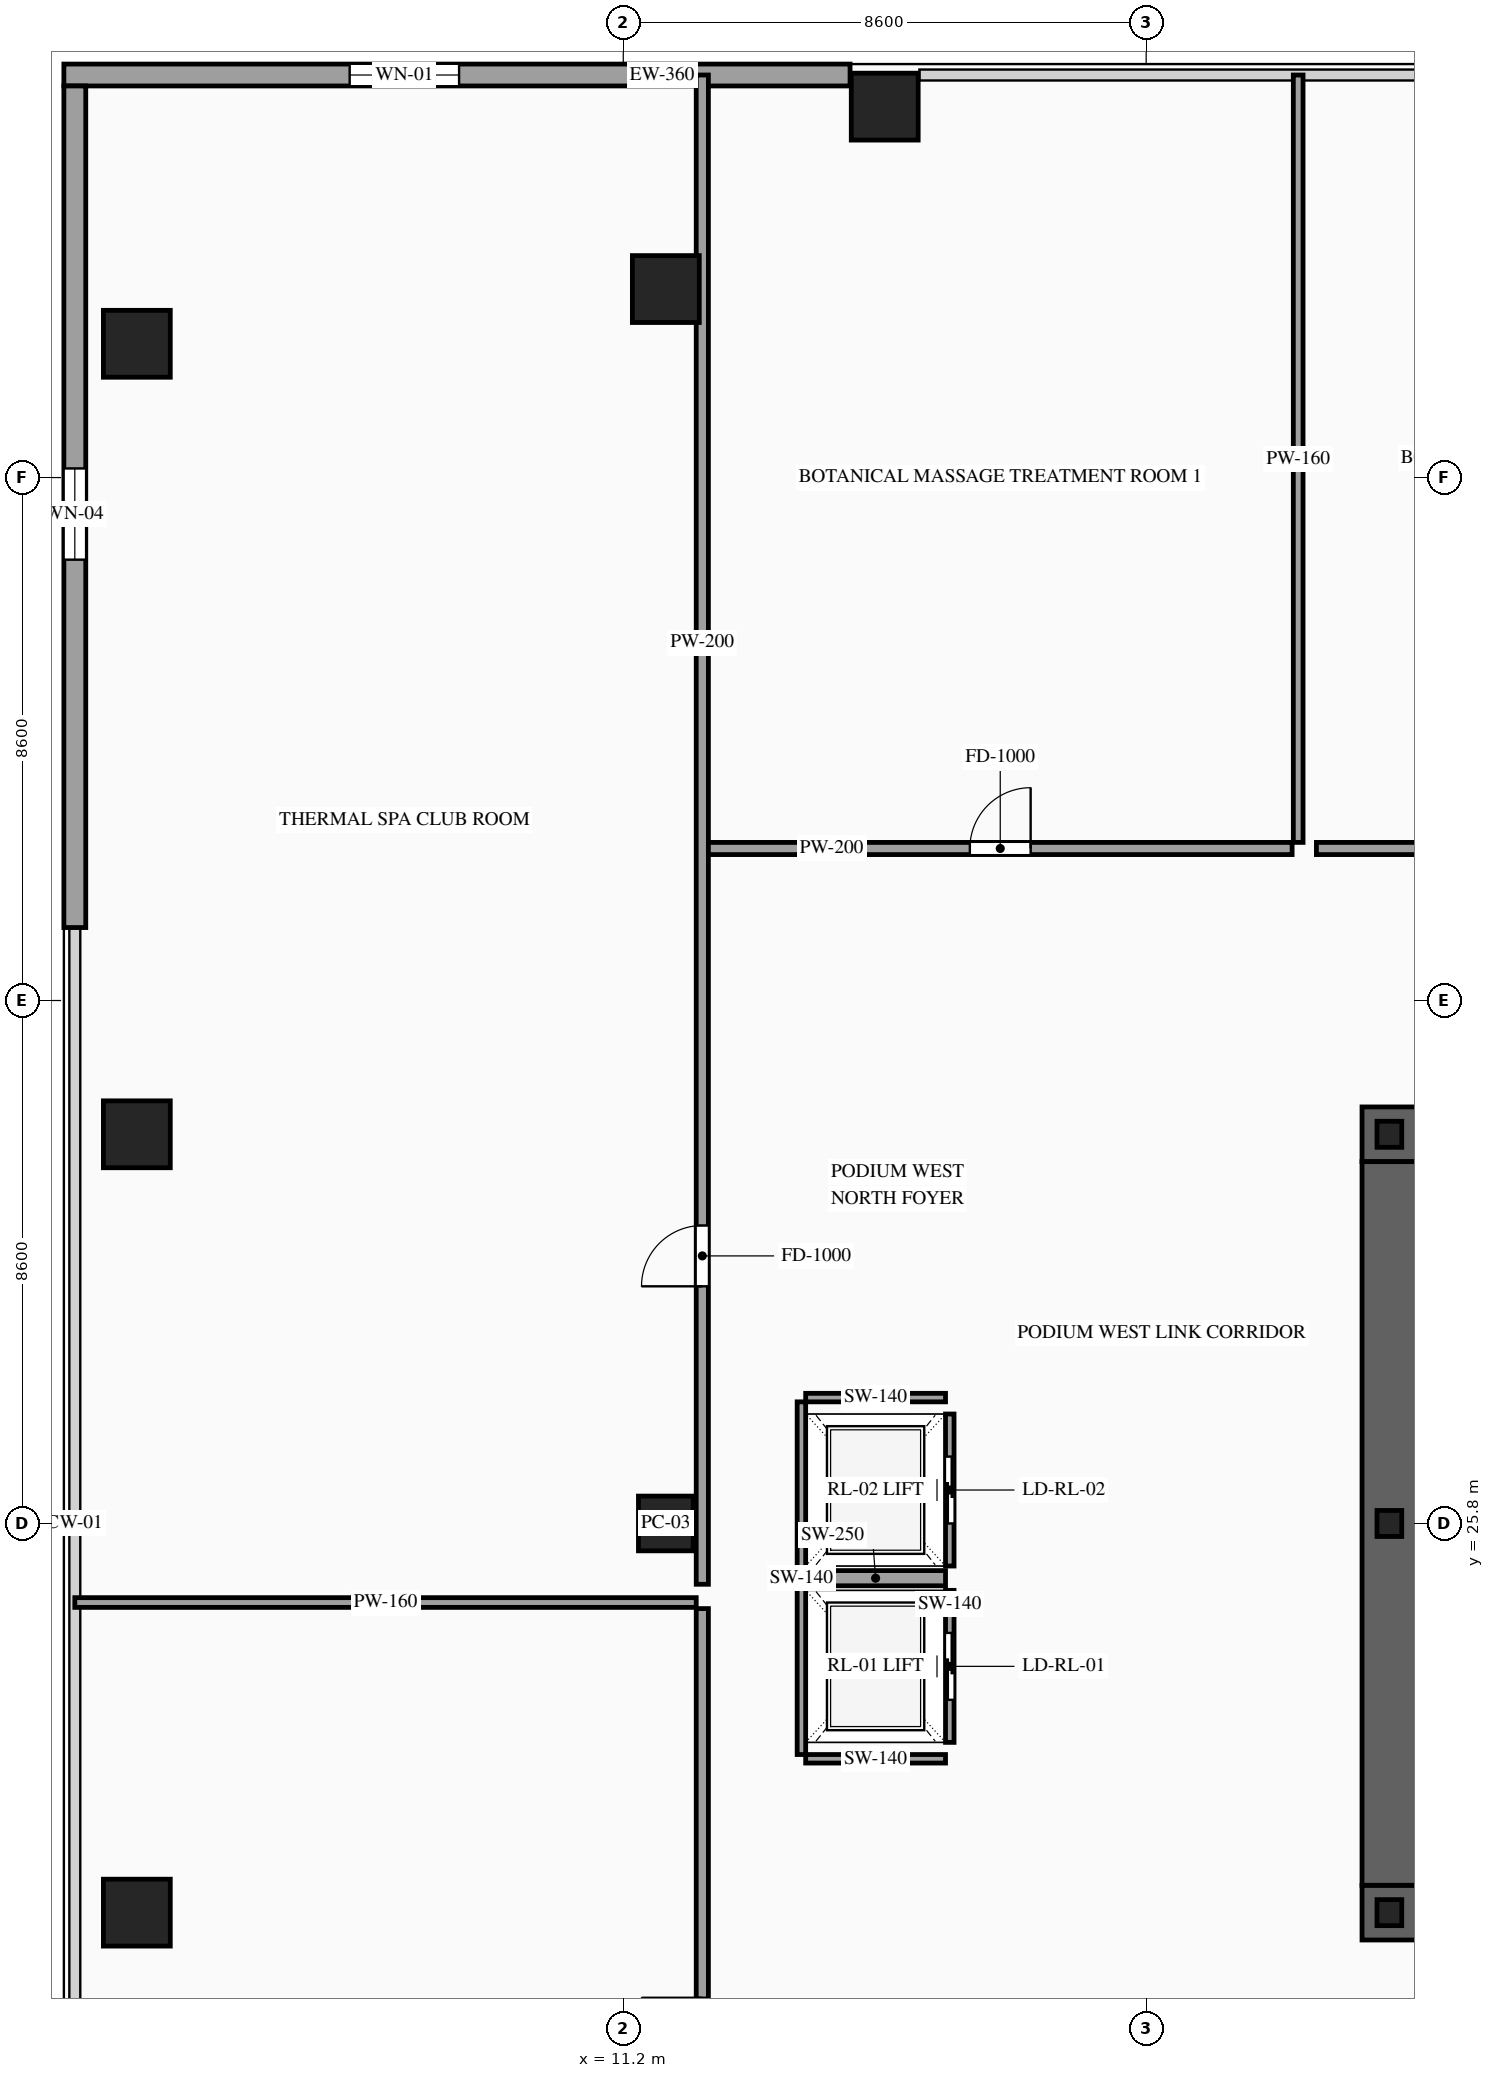
"""IFC4 building model, lengths in metres.
Left out: names, types, materials, properties, quantities, classifications, styles, units other than length and angle.
Written with IfcOpenShell. Run it as: python <this file> out.ifc"""

import sys

from ifc_helpers import new_model, si_unit, direction, frame, frame_2d, origin, origin_2d, place, context, subcontext, project, spatial, rectangle, i_section, extrude, source, transform, mapped, element, fill, save


model = new_model("IFC4")
c1 = context("Model", 3, precision=1e-05, world=origin(), true_north=direction((0.0, 1.0)))
c2 = subcontext(c1, "Body", "Model", "MODEL_VIEW")
j1 = project(units=[si_unit("LENGTHUNIT", "METRE"), si_unit("PLANEANGLEUNIT", "RADIAN")], contexts=[c1])
p1 = place(None, origin())
s1 = spatial("IfcSite", under=j1, at=p1, CompositionType="ELEMENT")
p2 = place(p1, origin())
s2 = spatial("IfcBuilding", under=s1, at=p2, CompositionType="ELEMENT")
p3 = place(p2, frame((0.0, 0.0, 15.0)))
s3 = spatial("IfcBuildingStorey", under=s2, at=p3, CompositionType="ELEMENT", Elevation=15.0)
p4 = place(p3, frame((23.35, 19.4, 0.0), z_axis=(0.0, 0.0, 1.0), x_axis=(1.0, 0.0, 0.0)))
e1 = element("IfcWall", 1, at=p4, inside=s3, PredefinedType="SHEAR", context=c2, shape_type="SweptSolid", body=[
    extrude(rectangle(XDim=27.3, YDim=0.9, at=frame_2d((13.65, 0.0))), origin(), (0.0, 0.0, 1.0), 4.8),
])
p5 = place(p4, frame((2.1, 0.0, 0.0)))
e2 = element("IfcOpeningElement", 2, at=p5, cuts=e1, PredefinedType="OPENING", context=c2, shape_type="SweptSolid", body=[
    extrude(rectangle(XDim=1.1, YDim=2.2, at=frame_2d((0.55, 1.1))), frame((0.0, 0.465, 0.0), z_axis=(0.0, -1.0, 0.0), x_axis=(1.0, 0.0, 0.0)), (0.0, 0.0, 1.0), 0.93),
])
p6 = place(p4, frame((10.0, 0.0, 0.0)))
e3 = element("IfcOpeningElement", 3, at=p6, cuts=e1, PredefinedType="OPENING", context=c2, shape_type="SweptSolid", body=[
    extrude(rectangle(XDim=1.1, YDim=2.2, at=frame_2d((0.55, 1.1))), frame((0.0, 0.465, 0.0), z_axis=(0.0, -1.0, 0.0), x_axis=(1.0, 0.0, 0.0)), (0.0, 0.0, 1.0), 0.93),
])
p7 = place(p4, frame((23.2, 0.0, 0.0)))
e4 = element("IfcOpeningElement", 4, at=p7, cuts=e1, PredefinedType="OPENING", context=c2, shape_type="SweptSolid", body=[
    extrude(rectangle(XDim=1.1, YDim=2.2, at=frame_2d((0.55, 1.1))), frame((0.0, 0.465, 0.0), z_axis=(0.0, -1.0, 0.0), x_axis=(1.0, 0.0, 0.0)), (0.0, 0.0, 1.0), 0.93),
])
p8 = place(p4, frame((19.82, 0.0, 0.0)))
e5 = element("IfcOpeningElement", 5, at=p8, cuts=e1, PredefinedType="OPENING", context=c2, shape_type="SweptSolid", body=[
    extrude(rectangle(XDim=0.9, YDim=2.15, at=frame_2d((0.45, 1.075))), frame((0.0, 0.465, 0.0), z_axis=(0.0, -1.0, 0.0), x_axis=(1.0, 0.0, 0.0)), (0.0, 0.0, 1.0), 0.93),
])
p9 = place(p4, frame((18.38, 0.0, 0.0)))
e6 = element("IfcOpeningElement", 6, at=p9, cuts=e1, PredefinedType="OPENING", context=c2, shape_type="SweptSolid", body=[
    extrude(rectangle(XDim=0.9, YDim=2.15, at=frame_2d((0.45, 1.075))), frame((0.0, 0.465, 0.0), z_axis=(0.0, -1.0, 0.0), x_axis=(1.0, 0.0, 0.0)), (0.0, 0.0, 1.0), 0.93),
])
p10 = place(p3, frame((23.35, 32.2, 0.0), z_axis=(0.0, 0.0, 1.0), x_axis=(1.0, 0.0, 0.0)))
e7 = element("IfcWall", 7, at=p10, inside=s3, PredefinedType="SHEAR", context=c2, shape_type="SweptSolid", body=[
    extrude(rectangle(XDim=27.3, YDim=0.9, at=frame_2d((13.65, 0.0))), origin(), (0.0, 0.0, 1.0), 4.8),
])
p11 = place(p10, frame((4.72, 0.0, 0.0)))
e8 = element("IfcOpeningElement", 8, at=p11, cuts=e7, PredefinedType="OPENING", context=c2, shape_type="SweptSolid", body=[
    extrude(rectangle(XDim=0.9, YDim=2.15, at=frame_2d((0.45, 1.075))), frame((0.0, 0.465, 0.0), z_axis=(0.0, -1.0, 0.0), x_axis=(1.0, 0.0, 0.0)), (0.0, 0.0, 1.0), 0.93),
])
p12 = place(p10, frame((10.0, 0.0, 0.0)))
e9 = element("IfcOpeningElement", 9, at=p12, cuts=e7, PredefinedType="OPENING", context=c2, shape_type="SweptSolid", body=[
    extrude(rectangle(XDim=1.1, YDim=2.2, at=frame_2d((0.55, 1.1))), frame((0.0, 0.465, 0.0), z_axis=(0.0, -1.0, 0.0), x_axis=(1.0, 0.0, 0.0)), (0.0, 0.0, 1.0), 0.93),
])
p13 = place(p10, frame((15.85, 0.0, 0.0)))
e10 = element("IfcOpeningElement", 10, at=p13, cuts=e7, PredefinedType="OPENING", context=c2, shape_type="SweptSolid", body=[
    extrude(rectangle(XDim=1.1, YDim=2.2, at=frame_2d((0.55, 1.1))), frame((0.0, 0.465, 0.0), z_axis=(0.0, -1.0, 0.0), x_axis=(1.0, 0.0, 0.0)), (0.0, 0.0, 1.0), 0.93),
])
p14 = place(p10, frame((19.05, 0.0, 0.0)))
e11 = element("IfcOpeningElement", 11, at=p14, cuts=e7, PredefinedType="OPENING", context=c2, shape_type="SweptSolid", body=[
    extrude(rectangle(XDim=0.9, YDim=2.15, at=frame_2d((0.45, 1.075))), frame((0.0, 0.465, 0.0), z_axis=(0.0, -1.0, 0.0), x_axis=(1.0, 0.0, 0.0)), (0.0, 0.0, 1.0), 0.93),
])
m1 = source(origin(), c2, "Body", "SweptSolid", [
    extrude(rectangle(XDim=11.9, YDim=0.9, at=frame_2d((5.95, 0.0))), origin(), (0.0, 0.0, 1.0), 4.8),
])
p15 = place(p3, frame((23.8, 19.85, 0.0), z_axis=(0.0, 0.0, 1.0), x_axis=(0.0, 1.0, 0.0)))
e12 = element("IfcWall", 12, at=p15, inside=s3, PredefinedType="SHEAR", context=c2, shape_type="MappedRepresentation", body=[
    mapped(m1, transform((0.0, 0.0, 0.0), scale=1.0)),
])
m2 = source(origin(), c2, "Body", "SweptSolid", [
    extrude(i_section(OverallWidth=0.407, OverallDepth=0.428, WebThickness=0.02, FlangeThickness=0.035, at=origin_2d()), origin(), (0.0, 0.0, 1.0), 4.8),
])
for number, where, z_axis, x_axis in (
    (13, (23.8, 19.4, 0.0), (0.0, 0.0, 1.0), (1.0, 0.0, 0.0)),
    (14, (23.8, 25.8, 0.0), (0.0, 0.0, 1.0), (1.0, 0.0, 0.0)),
    (15, (23.8, 32.2, 0.0), (0.0, 0.0, 1.0), (1.0, 0.0, 0.0)),
):
    element("IfcColumn", number, at=place(p3, frame(where, z_axis=z_axis, x_axis=x_axis)), inside=s3, PredefinedType="COLUMN", context=c2, shape_type="MappedRepresentation", body=[
        mapped(m2, transform((0.0, 0.0, 0.0), scale=1.0)),
    ])
m3 = source(origin(), c2, "Body", "SweptSolid", [
    extrude(rectangle(XDim=1.1, YDim=1.1, at=origin_2d()), origin(), (0.0, 0.0, 1.0), 4.8),
])
for number, where, z_axis, x_axis in (
    (16, (3.2, 19.4, 0.0), (0.0, 0.0, 1.0), (1.0, 0.0, 0.0)),
    (17, (3.2, 32.2, 0.0), (0.0, 0.0, 1.0), (1.0, 0.0, 0.0)),
    (18, (3.2, 45.2, 0.0), (0.0, 0.0, 1.0), (1.0, 0.0, 0.0)),
    (19, (11.9, 46.1, 0.0), (0.0, 0.0, 1.0), (1.0, 0.0, 0.0)),
    (20, (15.5, 49.1, 0.0), (0.0, 0.0, 1.0), (1.0, 0.0, 0.0)),
):
    element("IfcColumn", number, at=place(p3, frame(where, z_axis=z_axis, x_axis=x_axis)), inside=s3, PredefinedType="COLUMN", context=c2, shape_type="MappedRepresentation", body=[
        mapped(m3, transform((0.0, 0.0, 0.0), scale=1.0)),
    ])
m4 = source(origin(), c2, "Body", "SweptSolid", [
    extrude(rectangle(XDim=0.9, YDim=0.9, at=origin_2d()), origin(), (0.0, 0.0, 1.0), 4.8),
])
p16 = place(p3, frame((11.9, 25.8, 0.0), z_axis=(0.0, 0.0, 1.0), x_axis=(1.0, 0.0, 0.0)))
e21 = element("IfcColumn", 21, at=p16, inside=s3, PredefinedType="COLUMN", context=c2, shape_type="MappedRepresentation", body=[
    mapped(m4, transform((0.0, 0.0, 0.0), scale=1.0)),
])
p17 = place(p3, frame((2.0, 49.62, 0.0), z_axis=(0.0, 0.0, 1.0), x_axis=(1.0, 0.0, 0.0)))
e22 = element("IfcWall", 22, at=p17, inside=s3, PredefinedType="SOLIDWALL", context=c2, shape_type="SweptSolid", body=[
    extrude(rectangle(XDim=12.93, YDim=0.36, at=frame_2d((6.465, 0.0))), origin(), (0.0, 0.0, 1.0), 4.52),
])
p18 = place(p17, frame((4.7, 0.0, 0.9)))
e23 = element("IfcOpeningElement", 23, at=p18, cuts=e22, PredefinedType="OPENING", context=c2, shape_type="SweptSolid", body=[
    extrude(rectangle(XDim=1.8, YDim=2.2, at=frame_2d((0.9, 1.1))), frame((0.0, 0.195, 0.0), z_axis=(0.0, -1.0, 0.0), x_axis=(1.0, 0.0, 0.0)), (0.0, 0.0, 1.0), 0.39),
])
p19 = place(p3, frame((2.18, 35.6, 0.0), z_axis=(0.0, 0.0, 1.0), x_axis=(0.0, 1.0, 0.0)))
e24 = element("IfcWall", 24, at=p19, inside=s3, PredefinedType="SOLIDWALL", context=c2, shape_type="SweptSolid", body=[
    extrude(rectangle(XDim=13.84, YDim=0.36, at=frame_2d((6.92, 0.0))), origin(), (0.0, 0.0, 1.0), 4.52),
])
p20 = place(p19, frame((6.05, 0.0, 0.9)))
e25 = element("IfcOpeningElement", 25, at=p20, cuts=e24, PredefinedType="OPENING", context=c2, shape_type="SweptSolid", body=[
    extrude(rectangle(XDim=1.5, YDim=1.8, at=frame_2d((0.75, 0.9))), frame((0.0, 0.195, 0.0), z_axis=(0.0, -1.0, 0.0), x_axis=(1.0, 0.0, 0.0)), (0.0, 0.0, 1.0), 0.39),
])
p21 = place(p3, frame((16.57, 22.2, 0.0), z_axis=(0.0, 0.0, 1.0), x_axis=(0.0, 1.0, 0.0)))
e26 = element("IfcWall", 26, at=p21, inside=s3, PredefinedType="SOLIDWALL", context=c2, shape_type="SweptSolid", body=[
    extrude(rectangle(XDim=2.5, YDim=0.14, at=frame_2d((1.25, 0.0))), origin(), (0.0, 0.0, 1.0), 4.52),
])
p22 = place(p21, frame((0.7, 0.0, 0.0)))
e27 = element("IfcOpeningElement", 27, at=p22, cuts=e26, PredefinedType="OPENING", context=c2, shape_type="SweptSolid", body=[
    extrude(rectangle(XDim=1.1, YDim=2.2, at=frame_2d((0.55, 1.1))), frame((0.0, 0.085, 0.0), z_axis=(0.0, -1.0, 0.0), x_axis=(1.0, 0.0, 0.0)), (0.0, 0.0, 1.0), 0.17),
])
m5 = source(origin(), c2, "Body", "SweptSolid", [
    extrude(rectangle(XDim=2.3, YDim=0.25, at=frame_2d((1.15, 0.0))), origin(), (0.0, 0.0, 1.0), 4.52),
])
p23 = place(p3, frame((14.2, 24.9, 0.0), z_axis=(0.0, 0.0, 1.0), x_axis=(1.0, 0.0, 0.0)))
e28 = element("IfcWall", 28, at=p23, inside=s3, PredefinedType="SOLIDWALL", context=c2, shape_type="MappedRepresentation", body=[
    mapped(m5, transform((0.0, 0.0, 0.0), scale=1.0)),
])
m6 = source(origin(), c2, "Body", "SweptSolid", [
    extrude(rectangle(XDim=5.8, YDim=0.14, at=frame_2d((2.9, 0.0))), origin(), (0.0, 0.0, 1.0), 4.52),
])
p24 = place(p3, frame((14.13, 22.0, 0.0), z_axis=(0.0, 0.0, 1.0), x_axis=(0.0, 1.0, 0.0)))
e29 = element("IfcWall", 29, at=p24, inside=s3, PredefinedType="SOLIDWALL", context=c2, shape_type="MappedRepresentation", body=[
    mapped(m6, transform((0.0, 0.0, 0.0), scale=1.0)),
])
m7 = source(origin(), c2, "Body", "SweptSolid", [
    extrude(rectangle(XDim=2.3, YDim=0.14, at=frame_2d((1.15, 0.0))), origin(), (0.0, 0.0, 1.0), 4.52),
])
p25 = place(p3, frame((14.2, 21.93, 0.0), z_axis=(0.0, 0.0, 1.0), x_axis=(1.0, 0.0, 0.0)))
e30 = element("IfcWall", 30, at=p25, inside=s3, PredefinedType="SOLIDWALL", context=c2, shape_type="MappedRepresentation", body=[
    mapped(m7, transform((0.0, 0.0, 0.0), scale=1.0)),
])
p26 = place(p3, frame((16.57, 25.1, 0.0), z_axis=(0.0, 0.0, 1.0), x_axis=(0.0, 1.0, 0.0)))
e31 = element("IfcWall", 31, at=p26, inside=s3, PredefinedType="SOLIDWALL", context=c2, shape_type="SweptSolid", body=[
    extrude(rectangle(XDim=2.5, YDim=0.14, at=frame_2d((1.25, 0.0))), origin(), (0.0, 0.0, 1.0), 4.52),
])
p27 = place(p26, frame((0.7, 0.0, 0.0)))
e32 = element("IfcOpeningElement", 32, at=p27, cuts=e31, PredefinedType="OPENING", context=c2, shape_type="SweptSolid", body=[
    extrude(rectangle(XDim=1.1, YDim=2.2, at=frame_2d((0.55, 1.1))), frame((0.0, 0.085, 0.0), z_axis=(0.0, -1.0, 0.0), x_axis=(1.0, 0.0, 0.0)), (0.0, 0.0, 1.0), 0.17),
])
p28 = place(p3, frame((14.2, 27.87, 0.0), z_axis=(0.0, 0.0, 1.0), x_axis=(1.0, 0.0, 0.0)))
e33 = element("IfcWall", 33, at=p28, inside=s3, PredefinedType="SOLIDWALL", context=c2, shape_type="MappedRepresentation", body=[
    mapped(m7, transform((0.0, 0.0, 0.0), scale=1.0)),
])
p29 = place(p3, frame((12.5, 12.0, 0.0), z_axis=(0.0, 0.0, 1.0), x_axis=(0.0, 1.0, 0.0)))
e34 = element("IfcWall", 34, at=p29, inside=s3, PredefinedType="PARTITIONING", context=c2, shape_type="SweptSolid", body=[
    extrude(rectangle(XDim=12.4, YDim=0.2, at=frame_2d((6.2, 0.0))), origin(), (0.0, 0.0, 1.0), 4.52),
])
p30 = place(p29, frame((5.0, 0.0, 0.0)))
e35 = element("IfcOpeningElement", 35, at=p30, cuts=e34, PredefinedType="OPENING", context=c2, shape_type="SweptSolid", body=[
    extrude(rectangle(XDim=1.0, YDim=2.2, at=frame_2d((0.5, 1.1))), frame((0.0, 0.115, 0.0), z_axis=(0.0, -1.0, 0.0), x_axis=(1.0, 0.0, 0.0)), (0.0, 0.0, 1.0), 0.23),
])
m8 = source(origin(), c2, "Body", "SweptSolid", [
    extrude(rectangle(XDim=10.22, YDim=0.16, at=frame_2d((5.11, 0.0))), origin(), (0.0, 0.0, 1.0), 4.52),
])
p31 = place(p3, frame((2.18, 24.5, 0.0), z_axis=(0.0, 0.0, 1.0), x_axis=(1.0, 0.0, 0.0)))
e36 = element("IfcWall", 36, at=p31, inside=s3, PredefinedType="PARTITIONING", context=c2, shape_type="MappedRepresentation", body=[
    mapped(m8, transform((0.0, 0.0, 0.0), scale=1.0)),
])
p32 = place(p3, frame((12.5, 24.8, 0.0), z_axis=(0.0, 0.0, 1.0), x_axis=(0.0, 1.0, 0.0)))
e37 = element("IfcWall", 37, at=p32, inside=s3, PredefinedType="PARTITIONING", context=c2, shape_type="SweptSolid", body=[
    extrude(rectangle(XDim=24.82, YDim=0.2, at=frame_2d((12.41, 0.0))), origin(), (0.0, 0.0, 1.0), 4.52),
])
p33 = place(p32, frame((4.9, 0.0, 0.0)))
e38 = element("IfcOpeningElement", 38, at=p33, cuts=e37, PredefinedType="OPENING", context=c2, shape_type="SweptSolid", body=[
    extrude(rectangle(XDim=1.0, YDim=2.2, at=frame_2d((0.5, 1.1))), frame((0.0, 0.115, 0.0), z_axis=(0.0, -1.0, 0.0), x_axis=(1.0, 0.0, 0.0)), (0.0, 0.0, 1.0), 0.23),
])
p34 = place(p3, frame((12.6, 36.9, 0.0), z_axis=(0.0, 0.0, 1.0), x_axis=(1.0, 0.0, 0.0)))
e39 = element("IfcWall", 39, at=p34, inside=s3, PredefinedType="PARTITIONING", context=c2, shape_type="SweptSolid", body=[
    extrude(rectangle(XDim=9.6, YDim=0.2, at=frame_2d((4.8, 0.0))), origin(), (0.0, 0.0, 1.0), 4.52),
])
p35 = place(p34, frame((4.3, 0.0, 0.0)))
e40 = element("IfcOpeningElement", 40, at=p35, cuts=e39, PredefinedType="OPENING", context=c2, shape_type="SweptSolid", body=[
    extrude(rectangle(XDim=1.0, YDim=2.2, at=frame_2d((0.5, 1.1))), frame((0.0, 0.115, 0.0), z_axis=(0.0, -1.0, 0.0), x_axis=(1.0, 0.0, 0.0)), (0.0, 0.0, 1.0), 0.23),
])
m9 = source(origin(), c2, "Body", "SweptSolid", [
    extrude(rectangle(XDim=12.62, YDim=0.16, at=frame_2d((6.31, 0.0))), origin(), (0.0, 0.0, 1.0), 4.52),
])
p36 = place(p3, frame((22.3, 37.0, 0.0), z_axis=(0.0, 0.0, 1.0), x_axis=(0.0, 1.0, 0.0)))
e41 = element("IfcWall", 41, at=p36, inside=s3, PredefinedType="PARTITIONING", context=c2, shape_type="MappedRepresentation", body=[
    mapped(m9, transform((0.0, 0.0, 0.0), scale=1.0)),
])
p37 = place(p3, frame((22.6, 36.9, 0.0), z_axis=(0.0, 0.0, 1.0), x_axis=(1.0, 0.0, 0.0)))
e42 = element("IfcWall", 42, at=p37, inside=s3, PredefinedType="PARTITIONING", context=c2, shape_type="SweptSolid", body=[
    extrude(rectangle(XDim=9.4, YDim=0.2, at=frame_2d((4.7, 0.0))), origin(), (0.0, 0.0, 1.0), 4.52),
])
p38 = place(p37, frame((4.2, 0.0, 0.0)))
e43 = element("IfcOpeningElement", 43, at=p38, cuts=e42, PredefinedType="OPENING", context=c2, shape_type="SweptSolid", body=[
    extrude(rectangle(XDim=1.0, YDim=2.2, at=frame_2d((0.5, 1.1))), frame((0.0, 0.115, 0.0), z_axis=(0.0, -1.0, 0.0), x_axis=(1.0, 0.0, 0.0)), (0.0, 0.0, 1.0), 0.23),
])
m10 = source(origin(), c2, "Body", "SweptSolid", [
    extrude(rectangle(XDim=1.8, YDim=2.2, at=frame_2d((0.9, 1.1))), frame((0.0, 0.03, 0.0), z_axis=(0.0, -1.0, 0.0), x_axis=(1.0, 0.0, 0.0)), (0.0, 0.0, 1.0), 0.06),
])
p39 = place(p18, origin())
e44 = element("IfcWindow", 44, at=p39, inside=s3, PartitioningType="SINGLE_PANEL", PredefinedType="WINDOW", context=c2, shape_type="MappedRepresentation", body=[
    mapped(m10, transform((0.0, 0.0, 0.0), scale=1.0)),
])
fill(e23, e44)
m11 = source(origin(), c2, "Body", "SweptSolid", [
    extrude(rectangle(XDim=1.5, YDim=1.8, at=frame_2d((0.75, 0.9))), frame((0.0, 0.03, 0.0), z_axis=(0.0, -1.0, 0.0), x_axis=(1.0, 0.0, 0.0)), (0.0, 0.0, 1.0), 0.06),
])
p40 = place(p20, origin())
e45 = element("IfcWindow", 45, at=p40, inside=s3, PartitioningType="SINGLE_PANEL", PredefinedType="WINDOW", context=c2, shape_type="MappedRepresentation", body=[
    mapped(m11, transform((0.0, 0.0, 0.0), scale=1.0)),
])
fill(e25, e45)
m12 = source(origin(), c2, "Body", "SweptSolid", [
    extrude(rectangle(XDim=1.1, YDim=2.2, at=frame_2d((0.55, 1.1))), frame((0.0, 0.025, 0.0), z_axis=(0.0, -1.0, 0.0), x_axis=(1.0, 0.0, 0.0)), (0.0, 0.0, 1.0), 0.05),
])
p41 = place(p22, origin())
e46 = element("IfcDoor", 46, at=p41, inside=s3, OperationType="SLIDING_TO_RIGHT", PredefinedType="DOOR", context=c2, shape_type="MappedRepresentation", body=[
    mapped(m12, transform((0.0, 0.0, 0.0), scale=1.0)),
])
fill(e27, e46)
p42 = place(p27, origin())
e47 = element("IfcDoor", 47, at=p42, inside=s3, OperationType="SLIDING_TO_LEFT", PredefinedType="DOOR", context=c2, shape_type="MappedRepresentation", body=[
    mapped(m12, transform((0.0, 0.0, 0.0), scale=1.0)),
])
fill(e32, e47)
m13 = source(origin(), c2, "Body", "SweptSolid", [
    extrude(rectangle(XDim=1.0, YDim=2.2, at=frame_2d((0.5, 1.1))), frame((0.0, 0.025, 0.0), z_axis=(0.0, -1.0, 0.0), x_axis=(1.0, 0.0, 0.0)), (0.0, 0.0, 1.0), 0.05),
])
p43 = place(p33, origin())
e48 = element("IfcDoor", 48, at=p43, inside=s3, OperationType="SINGLE_SWING_LEFT", PredefinedType="DOOR", context=c2, shape_type="MappedRepresentation", body=[
    mapped(m13, transform((0.0, 0.0, 0.0), scale=1.0)),
])
fill(e38, e48)
p44 = place(p35, origin())
e49 = element("IfcDoor", 49, at=p44, inside=s3, OperationType="SINGLE_SWING_RIGHT", PredefinedType="DOOR", context=c2, shape_type="MappedRepresentation", body=[
    mapped(m13, transform((0.0, 0.0, 0.0), scale=1.0)),
])
fill(e40, e49)
save(model, sys.argv[1])
